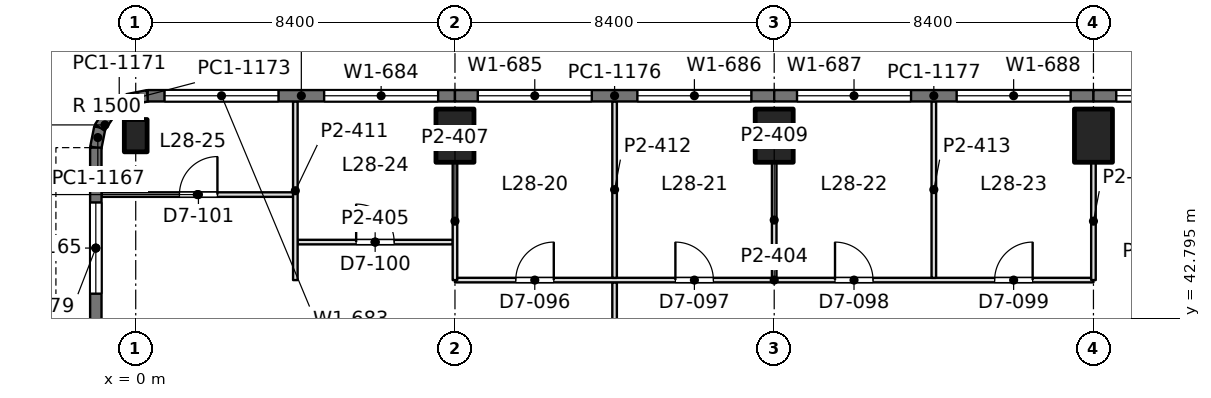
"""IFC4 building model, lengths in metres.
Left out: names, types, materials, properties, quantities, classifications, styles, units other than length and angle.
Written with IfcOpenShell. Run it as: python <this file> out.ifc"""

import sys

from ifc_helpers import new_model, si_unit, direction, frame, frame_2d, origin, origin_2d, place, context, subcontext, project, spatial, rectangle, extrude, element, fill, save


model = new_model("IFC4")
c1 = context("Model", 3, precision=1e-05, world=origin(), true_north=direction((0.0, 1.0)))
c2 = subcontext(c1, "Body", "Model", "MODEL_VIEW")
j1 = project(units=[si_unit("LENGTHUNIT", "METRE"), si_unit("PLANEANGLEUNIT", "RADIAN")], contexts=[c1])
p1 = place(None, origin())
s1 = spatial("IfcSite", under=j1, at=p1, CompositionType="ELEMENT")
p2 = place(p1, origin())
s2 = spatial("IfcBuilding", under=s1, at=p2, CompositionType="ELEMENT")
p3 = place(p2, frame((0.0, 0.0, 126.0)))
s3 = spatial("IfcBuildingStorey", under=s2, at=p3, CompositionType="ELEMENT", Elevation=126.0)
p4 = place(p3, frame((0.0, 47.6, 0.0), z_axis=(0.0, 0.0, 1.0), x_axis=(1.0, 0.0, 0.0)))
e1 = element("IfcColumn", 1, at=p4, inside=s3, PredefinedType="COLUMN", context=c2, shape_type="SweptSolid", body=[
    extrude(rectangle(XDim=0.6, YDim=0.85, at=origin_2d()), origin(), (0.0, 0.0, 1.0), 4.2),
])
for number, where, z_axis, x_axis in (
    (2, (8.4, 47.6, 0.0), (0.0, 0.0, 1.0), (1.0, 0.0, 0.0)),
    (3, (16.8, 47.6, 0.0), (0.0, 0.0, 1.0), (1.0, 0.0, 0.0)),
    (4, (25.2, 47.6, 0.0), (0.0, 0.0, 1.0), (1.0, 0.0, 0.0)),
):
    element("IfcColumn", number, at=place(p3, frame(where, z_axis=z_axis, x_axis=x_axis)), inside=s3, PredefinedType="COLUMN", context=c2, shape_type="SweptSolid", body=[
        extrude(rectangle(XDim=1.0, YDim=1.4, at=origin_2d()), origin(), (0.0, 0.0, 1.0), 4.2),
    ])
p5 = place(p3, frame((-1.05, 42.0, 0.0), z_axis=(0.0, 0.0, 1.0), x_axis=(0.0, 1.0, 0.0)))
e5 = element("IfcWall", 5, at=p5, inside=s3, PredefinedType="SOLIDWALL", context=c2, shape_type="SweptSolid", body=[
    extrude(rectangle(XDim=5.285, YDim=0.3, at=frame_2d((2.643, 0.0))), origin(), (0.0, 0.0, 1.0), 4.05),
])
p6 = place(p5, frame((1.443, 0.0, 0.9)))
e6 = element("IfcOpeningElement", 6, at=p6, cuts=e5, PredefinedType="OPENING", context=c2, shape_type="SweptSolid", body=[
    extrude(rectangle(XDim=2.4, YDim=1.9, at=frame_2d((1.2, 0.95))), frame((0.0, 0.16, 0.0), z_axis=(0.0, -1.0, 0.0), x_axis=(1.0, 0.0, 0.0)), (0.0, 0.0, 1.0), 0.32),
])
p7 = place(p3, frame((-1.05, 47.285, 0.0), z_axis=(0.0, 0.0, 1.0), x_axis=(0.195073962632, 0.980788534345, 0.0)))
e7 = element("IfcWall", 7, at=p7, inside=s3, PredefinedType="SOLIDWALL", context=c2, shape_type="SweptSolid", body=[
    extrude(rectangle(XDim=0.541, YDim=0.3, at=frame_2d((0.271, 0.0))), origin(), (0.0, 0.0, 1.0), 4.05),
])
p8 = place(p3, frame((-0.945, 47.815, 0.0), z_axis=(0.0, 0.0, 1.0), x_axis=(0.55534295404, 0.831621430339, 0.0)))
e8 = element("IfcWall", 8, at=p8, inside=s3, PredefinedType="SOLIDWALL", context=c2, shape_type="SweptSolid", body=[
    extrude(rectangle(XDim=0.526, YDim=0.3, at=frame_2d((0.263, 0.0))), origin(), (0.0, 0.0, 1.0), 4.05),
])
p9 = place(p3, frame((-0.653, 48.253, 0.0), z_axis=(0.0, 0.0, 1.0), x_axis=(0.831692711774, 0.555236195849, 0.0)))
e9 = element("IfcWall", 9, at=p9, inside=s3, PredefinedType="SOLIDWALL", context=c2, shape_type="SweptSolid", body=[
    extrude(rectangle(XDim=0.525, YDim=0.3, at=frame_2d((0.263, 0.0))), origin(), (0.0, 0.0, 1.0), 4.05),
])
p10 = place(p3, frame((-0.216, 48.544, 0.0), z_axis=(0.0, 0.0, 1.0), x_axis=(0.980788534345, 0.195073962632, 0.0)))
e10 = element("IfcWall", 10, at=p10, inside=s3, PredefinedType="SOLIDWALL", context=c2, shape_type="SweptSolid", body=[
    extrude(rectangle(XDim=0.541, YDim=0.3, at=frame_2d((0.271, 0.0))), origin(), (0.0, 0.0, 1.0), 4.05),
])
p11 = place(p3, frame((0.315, 48.65, 0.0), z_axis=(0.0, 0.0, 1.0), x_axis=(1.0, 0.0, 0.0)))
e11 = element("IfcWall", 11, at=p11, inside=s3, PredefinedType="SOLIDWALL", context=c2, shape_type="SweptSolid", body=[
    extrude(rectangle(XDim=8.085, YDim=0.3, at=frame_2d((4.042, 0.0))), origin(), (0.0, 0.0, 1.0), 4.05),
])
p12 = place(p11, frame((0.443, 0.0, 0.9)))
e12 = element("IfcOpeningElement", 12, at=p12, cuts=e11, PredefinedType="OPENING", context=c2, shape_type="SweptSolid", body=[
    extrude(rectangle(XDim=3.0, YDim=1.9, at=frame_2d((1.5, 0.95))), frame((0.0, 0.16, 0.0), z_axis=(0.0, -1.0, 0.0), x_axis=(1.0, 0.0, 0.0)), (0.0, 0.0, 1.0), 0.32),
])
p13 = place(p11, frame((4.643, 0.0, 0.9)))
e13 = element("IfcOpeningElement", 13, at=p13, cuts=e11, PredefinedType="OPENING", context=c2, shape_type="SweptSolid", body=[
    extrude(rectangle(XDim=3.0, YDim=1.9, at=frame_2d((1.5, 0.95))), frame((0.0, 0.16, 0.0), z_axis=(0.0, -1.0, 0.0), x_axis=(1.0, 0.0, 0.0)), (0.0, 0.0, 1.0), 0.32),
])
p14 = place(p3, frame((8.4, 48.65, 0.0), z_axis=(0.0, 0.0, 1.0), x_axis=(1.0, 0.0, 0.0)))
e14 = element("IfcWall", 14, at=p14, inside=s3, PredefinedType="SOLIDWALL", context=c2, shape_type="SweptSolid", body=[
    extrude(rectangle(XDim=8.4, YDim=0.3, at=frame_2d((4.2, 0.0))), origin(), (0.0, 0.0, 1.0), 4.05),
])
p15 = place(p14, frame((0.6, 0.0, 0.9)))
e15 = element("IfcOpeningElement", 15, at=p15, cuts=e14, PredefinedType="OPENING", context=c2, shape_type="SweptSolid", body=[
    extrude(rectangle(XDim=3.0, YDim=1.9, at=frame_2d((1.5, 0.95))), frame((0.0, 0.16, 0.0), z_axis=(0.0, -1.0, 0.0), x_axis=(1.0, 0.0, 0.0)), (0.0, 0.0, 1.0), 0.32),
])
p16 = place(p14, frame((4.8, 0.0, 0.9)))
e16 = element("IfcOpeningElement", 16, at=p16, cuts=e14, PredefinedType="OPENING", context=c2, shape_type="SweptSolid", body=[
    extrude(rectangle(XDim=3.0, YDim=1.9, at=frame_2d((1.5, 0.95))), frame((0.0, 0.16, 0.0), z_axis=(0.0, -1.0, 0.0), x_axis=(1.0, 0.0, 0.0)), (0.0, 0.0, 1.0), 0.32),
])
p17 = place(p3, frame((16.8, 48.65, 0.0), z_axis=(0.0, 0.0, 1.0), x_axis=(1.0, 0.0, 0.0)))
e17 = element("IfcWall", 17, at=p17, inside=s3, PredefinedType="SOLIDWALL", context=c2, shape_type="SweptSolid", body=[
    extrude(rectangle(XDim=8.4, YDim=0.3, at=frame_2d((4.2, 0.0))), origin(), (0.0, 0.0, 1.0), 4.05),
])
p18 = place(p17, frame((0.6, 0.0, 0.9)))
e18 = element("IfcOpeningElement", 18, at=p18, cuts=e17, PredefinedType="OPENING", context=c2, shape_type="SweptSolid", body=[
    extrude(rectangle(XDim=3.0, YDim=1.9, at=frame_2d((1.5, 0.95))), frame((0.0, 0.16, 0.0), z_axis=(0.0, -1.0, 0.0), x_axis=(1.0, 0.0, 0.0)), (0.0, 0.0, 1.0), 0.32),
])
p19 = place(p17, frame((4.8, 0.0, 0.9)))
e19 = element("IfcOpeningElement", 19, at=p19, cuts=e17, PredefinedType="OPENING", context=c2, shape_type="SweptSolid", body=[
    extrude(rectangle(XDim=3.0, YDim=1.9, at=frame_2d((1.5, 0.95))), frame((0.0, 0.16, 0.0), z_axis=(0.0, -1.0, 0.0), x_axis=(1.0, 0.0, 0.0)), (0.0, 0.0, 1.0), 0.32),
])
p20 = place(p3, frame((25.2, 48.65, 0.0), z_axis=(0.0, 0.0, 1.0), x_axis=(1.0, 0.0, 0.0)))
e20 = element("IfcWall", 20, at=p20, inside=s3, PredefinedType="SOLIDWALL", context=c2, shape_type="SweptSolid", body=[
    extrude(rectangle(XDim=8.4, YDim=0.3, at=frame_2d((4.2, 0.0))), origin(), (0.0, 0.0, 1.0), 4.05),
])
p21 = place(p20, frame((0.6, 0.0, 0.9)))
e21 = element("IfcOpeningElement", 21, at=p21, cuts=e20, PredefinedType="OPENING", context=c2, shape_type="SweptSolid", body=[
    extrude(rectangle(XDim=3.0, YDim=1.9, at=frame_2d((1.5, 0.95))), frame((0.0, 0.16, 0.0), z_axis=(0.0, -1.0, 0.0), x_axis=(1.0, 0.0, 0.0)), (0.0, 0.0, 1.0), 0.32),
])
p22 = place(p20, frame((4.8, 0.0, 0.9)))
e22 = element("IfcOpeningElement", 22, at=p22, cuts=e20, PredefinedType="OPENING", context=c2, shape_type="SweptSolid", body=[
    extrude(rectangle(XDim=3.0, YDim=1.9, at=frame_2d((1.5, 0.95))), frame((0.0, 0.16, 0.0), z_axis=(0.0, -1.0, 0.0), x_axis=(1.0, 0.0, 0.0)), (0.0, 0.0, 1.0), 0.32),
])
p23 = place(p3, frame((-0.902, 46.05, 0.0), z_axis=(0.0, 0.0, 1.0), x_axis=(1.0, 0.0, 0.0)))
e23 = element("IfcWall", 23, at=p23, inside=s3, PredefinedType="PARTITIONING", context=c2, shape_type="SweptSolid", body=[
    extrude(rectangle(XDim=5.044, YDim=0.12, at=frame_2d((2.522, 0.0))), origin(), (0.0, 0.0, 1.0), 3.56),
])
p24 = place(p23, frame((2.052, 0.0, 0.0)))
e24 = element("IfcOpeningElement", 24, at=p24, cuts=e23, PredefinedType="OPENING", context=c2, shape_type="SweptSolid", body=[
    extrude(rectangle(XDim=1.0, YDim=2.4, at=frame_2d((0.5, 1.2))), frame((0.0, 0.07, 0.0), z_axis=(0.0, -1.0, 0.0), x_axis=(1.0, 0.0, 0.0)), (0.0, 0.0, 1.0), 0.14),
])
p25 = place(p3, frame((4.258, 44.8, 0.0), z_axis=(0.0, 0.0, 1.0), x_axis=(1.0, 0.0, 0.0)))
e25 = element("IfcWall", 25, at=p25, inside=s3, PredefinedType="PARTITIONING", context=c2, shape_type="SweptSolid", body=[
    extrude(rectangle(XDim=4.084, YDim=0.12, at=frame_2d((2.042, 0.0))), origin(), (0.0, 0.0, 1.0), 3.55),
])
p26 = place(p25, frame((1.542, 0.0, 0.0)))
e26 = element("IfcOpeningElement", 26, at=p26, cuts=e25, PredefinedType="OPENING", context=c2, shape_type="SweptSolid", body=[
    extrude(rectangle(XDim=1.0, YDim=2.4, at=frame_2d((0.5, 1.2))), frame((0.0, 0.07, 0.0), z_axis=(0.0, -1.0, 0.0), x_axis=(1.0, 0.0, 0.0)), (0.0, 0.0, 1.0), 0.14),
])
p27 = place(p3, frame((8.4, 43.8, 0.0), z_axis=(0.0, 0.0, 1.0), x_axis=(1.0, 0.0, 0.0)))
e27 = element("IfcWall", 27, at=p27, inside=s3, PredefinedType="PARTITIONING", context=c2, shape_type="SweptSolid", body=[
    extrude(rectangle(XDim=16.8, YDim=0.12, at=frame_2d((8.4, 0.0))), origin(), (0.0, 0.0, 1.0), 3.55),
])
p28 = place(p27, frame((1.6, 0.0, 0.0)))
e28 = element("IfcOpeningElement", 28, at=p28, cuts=e27, PredefinedType="OPENING", context=c2, shape_type="SweptSolid", body=[
    extrude(rectangle(XDim=1.0, YDim=2.4, at=frame_2d((0.5, 1.2))), frame((0.0, 0.07, 0.0), z_axis=(0.0, -1.0, 0.0), x_axis=(1.0, 0.0, 0.0)), (0.0, 0.0, 1.0), 0.14),
])
p29 = place(p27, frame((5.8, 0.0, 0.0)))
e29 = element("IfcOpeningElement", 29, at=p29, cuts=e27, PredefinedType="OPENING", context=c2, shape_type="SweptSolid", body=[
    extrude(rectangle(XDim=1.0, YDim=2.4, at=frame_2d((0.5, 1.2))), frame((0.0, 0.07, 0.0), z_axis=(0.0, -1.0, 0.0), x_axis=(1.0, 0.0, 0.0)), (0.0, 0.0, 1.0), 0.14),
])
p30 = place(p27, frame((10.0, 0.0, 0.0)))
e30 = element("IfcOpeningElement", 30, at=p30, cuts=e27, PredefinedType="OPENING", context=c2, shape_type="SweptSolid", body=[
    extrude(rectangle(XDim=1.0, YDim=2.4, at=frame_2d((0.5, 1.2))), frame((0.0, 0.07, 0.0), z_axis=(0.0, -1.0, 0.0), x_axis=(1.0, 0.0, 0.0)), (0.0, 0.0, 1.0), 0.14),
])
p31 = place(p27, frame((14.2, 0.0, 0.0)))
e31 = element("IfcOpeningElement", 31, at=p31, cuts=e27, PredefinedType="OPENING", context=c2, shape_type="SweptSolid", body=[
    extrude(rectangle(XDim=1.0, YDim=2.4, at=frame_2d((0.5, 1.2))), frame((0.0, 0.07, 0.0), z_axis=(0.0, -1.0, 0.0), x_axis=(1.0, 0.0, 0.0)), (0.0, 0.0, 1.0), 0.14),
])
p32 = place(p3, frame((4.2, 43.8, 0.0), z_axis=(0.0, 0.0, 1.0), x_axis=(0.0, 1.0, 0.0)))
e32 = element("IfcWall", 32, at=p32, inside=s3, PredefinedType="PARTITIONING", context=c2, shape_type="SweptSolid", body=[
    extrude(rectangle(XDim=4.702, YDim=0.12, at=frame_2d((2.351, 0.0))), origin(), (0.0, 0.0, 1.0), 3.56),
])
p33 = place(p3, frame((8.4, 43.8, 0.0), z_axis=(0.0, 0.0, 1.0), x_axis=(0.0, 1.0, 0.0)))
e33 = element("IfcWall", 33, at=p33, inside=s3, PredefinedType="PARTITIONING", context=c2, shape_type="SweptSolid", body=[
    extrude(rectangle(XDim=3.101, YDim=0.12, at=frame_2d((1.55, 0.0))), origin(), (0.0, 0.0, 1.0), 3.55),
])
p34 = place(p3, frame((12.6, 43.858, 0.0), z_axis=(0.0, 0.0, 1.0), x_axis=(0.0, 1.0, 0.0)))
e34 = element("IfcWall", 34, at=p34, inside=s3, PredefinedType="PARTITIONING", context=c2, shape_type="SweptSolid", body=[
    extrude(rectangle(XDim=4.644, YDim=0.12, at=frame_2d((2.322, 0.0))), origin(), (0.0, 0.0, 1.0), 3.56),
])
p35 = place(p3, frame((16.8, 43.858, 0.0), z_axis=(0.0, 0.0, 1.0), x_axis=(0.0, 1.0, 0.0)))
e35 = element("IfcWall", 35, at=p35, inside=s3, PredefinedType="PARTITIONING", context=c2, shape_type="SweptSolid", body=[
    extrude(rectangle(XDim=3.043, YDim=0.12, at=frame_2d((1.521, 0.0))), origin(), (0.0, 0.0, 1.0), 3.55),
])
p36 = place(p3, frame((21.0, 43.858, 0.0), z_axis=(0.0, 0.0, 1.0), x_axis=(0.0, 1.0, 0.0)))
e36 = element("IfcWall", 36, at=p36, inside=s3, PredefinedType="PARTITIONING", context=c2, shape_type="SweptSolid", body=[
    extrude(rectangle(XDim=4.644, YDim=0.12, at=frame_2d((2.322, 0.0))), origin(), (0.0, 0.0, 1.0), 3.56),
])
p37 = place(p3, frame((25.2, 43.8, 0.0), z_axis=(0.0, 0.0, 1.0), x_axis=(0.0, 1.0, 0.0)))
e37 = element("IfcWall", 37, at=p37, inside=s3, PredefinedType="PARTITIONING", context=c2, shape_type="SweptSolid", body=[
    extrude(rectangle(XDim=3.101, YDim=0.12, at=frame_2d((1.55, 0.0))), origin(), (0.0, 0.0, 1.0), 3.55),
])
p38 = place(p3, frame((12.6, 39.858, 0.0), z_axis=(0.0, 0.0, 1.0), x_axis=(0.0, 1.0, 0.0)))
e38 = element("IfcWall", 38, at=p38, inside=s3, PredefinedType="PARTITIONING", context=c2, shape_type="SweptSolid", body=[
    extrude(rectangle(XDim=3.884, YDim=0.12, at=frame_2d((1.942, 0.0))), origin(), (0.0, 0.0, 1.0), 3.55),
])
p39 = place(p6, origin())
e39 = element("IfcWindow", 39, at=p39, inside=s3, PartitioningType="SINGLE_PANEL", PredefinedType="WINDOW", context=c2, shape_type="SweptSolid", body=[
    extrude(rectangle(XDim=2.4, YDim=1.9, at=frame_2d((1.2, 0.95))), frame((0.0, 0.03, 0.0), z_axis=(0.0, -1.0, 0.0), x_axis=(1.0, 0.0, 0.0)), (0.0, 0.0, 1.0), 0.06),
])
fill(e6, e39)
p40 = place(p12, origin())
e40 = element("IfcWindow", 40, at=p40, inside=s3, PartitioningType="SINGLE_PANEL", PredefinedType="WINDOW", context=c2, shape_type="SweptSolid", body=[
    extrude(rectangle(XDim=3.0, YDim=1.9, at=frame_2d((1.5, 0.95))), frame((0.0, 0.03, 0.0), z_axis=(0.0, -1.0, 0.0), x_axis=(1.0, 0.0, 0.0)), (0.0, 0.0, 1.0), 0.06),
])
fill(e12, e40)
p41 = place(p13, origin())
e41 = element("IfcWindow", 41, at=p41, inside=s3, PartitioningType="SINGLE_PANEL", PredefinedType="WINDOW", context=c2, shape_type="SweptSolid", body=[
    extrude(rectangle(XDim=3.0, YDim=1.9, at=frame_2d((1.5, 0.95))), frame((0.0, 0.03, 0.0), z_axis=(0.0, -1.0, 0.0), x_axis=(1.0, 0.0, 0.0)), (0.0, 0.0, 1.0), 0.06),
])
fill(e13, e41)
p42 = place(p15, origin())
e42 = element("IfcWindow", 42, at=p42, inside=s3, PartitioningType="SINGLE_PANEL", PredefinedType="WINDOW", context=c2, shape_type="SweptSolid", body=[
    extrude(rectangle(XDim=3.0, YDim=1.9, at=frame_2d((1.5, 0.95))), frame((0.0, 0.03, 0.0), z_axis=(0.0, -1.0, 0.0), x_axis=(1.0, 0.0, 0.0)), (0.0, 0.0, 1.0), 0.06),
])
fill(e15, e42)
p43 = place(p16, origin())
e43 = element("IfcWindow", 43, at=p43, inside=s3, PartitioningType="SINGLE_PANEL", PredefinedType="WINDOW", context=c2, shape_type="SweptSolid", body=[
    extrude(rectangle(XDim=3.0, YDim=1.9, at=frame_2d((1.5, 0.95))), frame((0.0, 0.03, 0.0), z_axis=(0.0, -1.0, 0.0), x_axis=(1.0, 0.0, 0.0)), (0.0, 0.0, 1.0), 0.06),
])
fill(e16, e43)
p44 = place(p18, origin())
e44 = element("IfcWindow", 44, at=p44, inside=s3, PartitioningType="SINGLE_PANEL", PredefinedType="WINDOW", context=c2, shape_type="SweptSolid", body=[
    extrude(rectangle(XDim=3.0, YDim=1.9, at=frame_2d((1.5, 0.95))), frame((0.0, 0.03, 0.0), z_axis=(0.0, -1.0, 0.0), x_axis=(1.0, 0.0, 0.0)), (0.0, 0.0, 1.0), 0.06),
])
fill(e18, e44)
p45 = place(p19, origin())
e45 = element("IfcWindow", 45, at=p45, inside=s3, PartitioningType="SINGLE_PANEL", PredefinedType="WINDOW", context=c2, shape_type="SweptSolid", body=[
    extrude(rectangle(XDim=3.0, YDim=1.9, at=frame_2d((1.5, 0.95))), frame((0.0, 0.03, 0.0), z_axis=(0.0, -1.0, 0.0), x_axis=(1.0, 0.0, 0.0)), (0.0, 0.0, 1.0), 0.06),
])
fill(e19, e45)
p46 = place(p21, origin())
e46 = element("IfcWindow", 46, at=p46, inside=s3, PartitioningType="SINGLE_PANEL", PredefinedType="WINDOW", context=c2, shape_type="SweptSolid", body=[
    extrude(rectangle(XDim=3.0, YDim=1.9, at=frame_2d((1.5, 0.95))), frame((0.0, 0.03, 0.0), z_axis=(0.0, -1.0, 0.0), x_axis=(1.0, 0.0, 0.0)), (0.0, 0.0, 1.0), 0.06),
])
fill(e21, e46)
p47 = place(p24, origin())
e47 = element("IfcDoor", 47, at=p47, inside=s3, OperationType="SINGLE_SWING_RIGHT", PredefinedType="DOOR", context=c2, shape_type="SweptSolid", body=[
    extrude(rectangle(XDim=1.0, YDim=2.4, at=frame_2d((0.5, 1.2))), frame((0.0, 0.025, 0.0), z_axis=(0.0, -1.0, 0.0), x_axis=(1.0, 0.0, 0.0)), (0.0, 0.0, 1.0), 0.05),
])
fill(e24, e47)
p48 = place(p26, origin())
e48 = element("IfcDoor", 48, at=p48, inside=s3, OperationType="SINGLE_SWING_LEFT", PredefinedType="DOOR", context=c2, shape_type="SweptSolid", body=[
    extrude(rectangle(XDim=1.0, YDim=2.4, at=frame_2d((0.5, 1.2))), frame((0.0, 0.025, 0.0), z_axis=(0.0, -1.0, 0.0), x_axis=(1.0, 0.0, 0.0)), (0.0, 0.0, 1.0), 0.05),
])
fill(e26, e48)
p49 = place(p28, origin())
e49 = element("IfcDoor", 49, at=p49, inside=s3, OperationType="SINGLE_SWING_RIGHT", PredefinedType="DOOR", context=c2, shape_type="SweptSolid", body=[
    extrude(rectangle(XDim=1.0, YDim=2.4, at=frame_2d((0.5, 1.2))), frame((0.0, 0.025, 0.0), z_axis=(0.0, -1.0, 0.0), x_axis=(1.0, 0.0, 0.0)), (0.0, 0.0, 1.0), 0.05),
])
fill(e28, e49)
p50 = place(p29, origin())
e50 = element("IfcDoor", 50, at=p50, inside=s3, OperationType="SINGLE_SWING_LEFT", PredefinedType="DOOR", context=c2, shape_type="SweptSolid", body=[
    extrude(rectangle(XDim=1.0, YDim=2.4, at=frame_2d((0.5, 1.2))), frame((0.0, 0.025, 0.0), z_axis=(0.0, -1.0, 0.0), x_axis=(1.0, 0.0, 0.0)), (0.0, 0.0, 1.0), 0.05),
])
fill(e29, e50)
p51 = place(p30, origin())
e51 = element("IfcDoor", 51, at=p51, inside=s3, OperationType="SINGLE_SWING_LEFT", PredefinedType="DOOR", context=c2, shape_type="SweptSolid", body=[
    extrude(rectangle(XDim=1.0, YDim=2.4, at=frame_2d((0.5, 1.2))), frame((0.0, 0.025, 0.0), z_axis=(0.0, -1.0, 0.0), x_axis=(1.0, 0.0, 0.0)), (0.0, 0.0, 1.0), 0.05),
])
fill(e30, e51)
p52 = place(p31, origin())
e52 = element("IfcDoor", 52, at=p52, inside=s3, OperationType="SINGLE_SWING_RIGHT", PredefinedType="DOOR", context=c2, shape_type="SweptSolid", body=[
    extrude(rectangle(XDim=1.0, YDim=2.4, at=frame_2d((0.5, 1.2))), frame((0.0, 0.025, 0.0), z_axis=(0.0, -1.0, 0.0), x_axis=(1.0, 0.0, 0.0)), (0.0, 0.0, 1.0), 0.05),
])
fill(e31, e52)
save(model, sys.argv[1])
